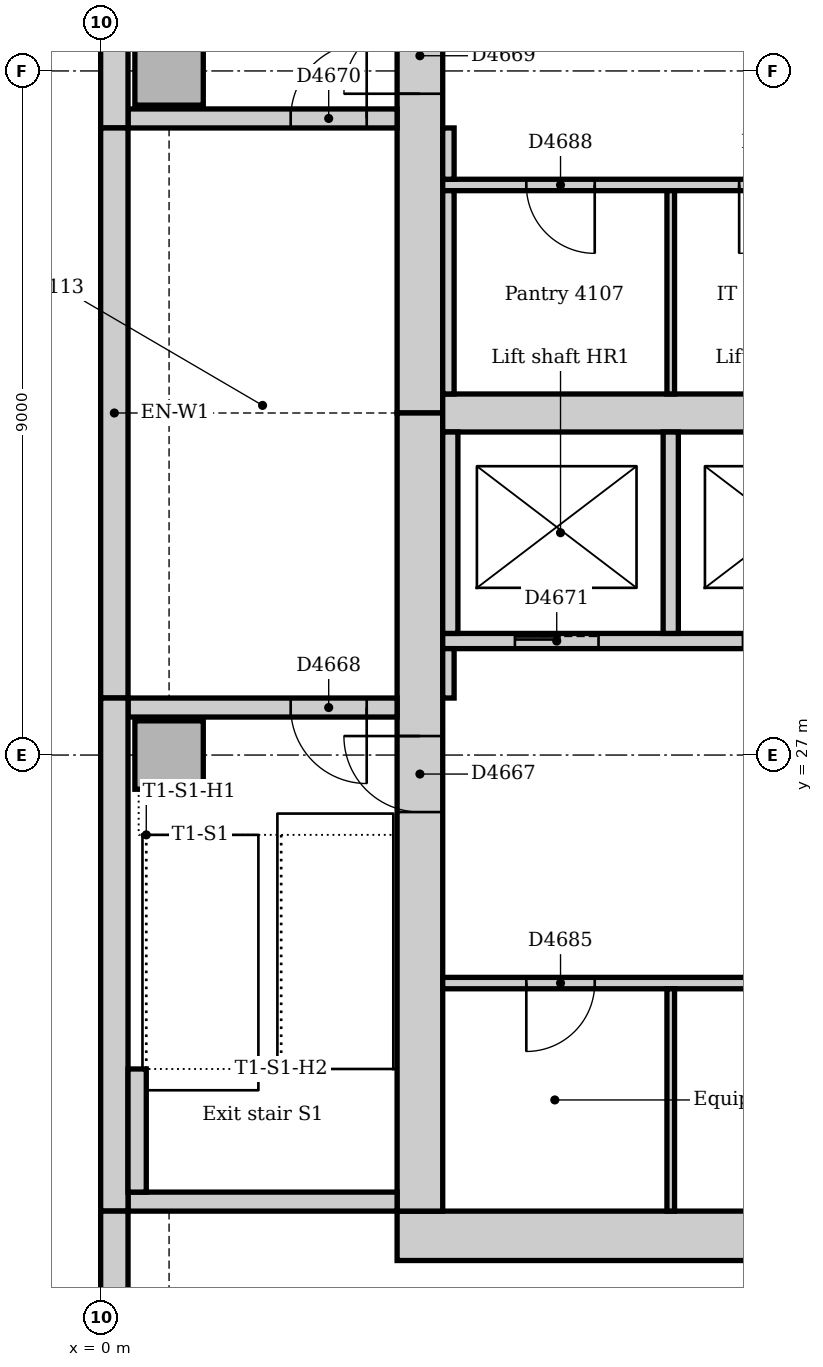
"""IFC4 building model, lengths in metres.
Left out: names, types, materials, properties, quantities, classifications, styles, units other than length and angle.
Written with IfcOpenShell. Run it as: python <this file> out.ifc"""

import sys

from ifc_helpers import new_model, si_unit, direction, frame, frame_2d, origin, origin_2d, place, context, subcontext, project, spatial, rectangle, extrude, element, fill, save


model = new_model("IFC4")
c1 = context("Model", 3, precision=1e-05, world=origin(), true_north=direction((0.0, 1.0)))
c2 = subcontext(c1, "Body", "Model", "MODEL_VIEW")
j1 = project(units=[si_unit("LENGTHUNIT", "METRE"), si_unit("PLANEANGLEUNIT", "RADIAN")], contexts=[c1])
p1 = place(None, origin())
s1 = spatial("IfcSite", under=j1, at=p1, CompositionType="ELEMENT")
p2 = place(p1, origin())
s2 = spatial("IfcBuilding", under=s1, at=p2, CompositionType="ELEMENT")
p3 = place(p2, frame((0.0, 0.0, 173.0)))
s3 = spatial("IfcBuildingStorey", under=s2, at=p3, CompositionType="ELEMENT", Elevation=173.0)
p4 = place(p3, frame((3.9, 20.675, 0.0), z_axis=(0.0, 0.0, 1.0), x_axis=(1.0, 0.0, 0.0)))
e1 = element("IfcWall", 1, at=p4, inside=s3, PredefinedType="SOLIDWALL", context=c2, shape_type="SweptSolid", body=[
    extrude(rectangle(XDim=19.25, YDim=0.65, at=frame_2d((9.625, 0.0))), origin(), (0.0, 0.0, 1.0), 4.0),
])
p5 = place(p3, frame((4.2, 42.0, 0.0), z_axis=(0.0, 0.0, 1.0), x_axis=(0.0, -1.0, 0.0)))
e2 = element("IfcWall", 2, at=p5, inside=s3, PredefinedType="SOLIDWALL", context=c2, shape_type="SweptSolid", body=[
    extrude(rectangle(XDim=10.5, YDim=0.6, at=frame_2d((5.25, 0.0))), origin(), (0.0, 0.0, 1.0), 4.0),
])
p6 = place(p5, frame((5.3, 0.0, 0.0)))
e3 = element("IfcOpeningElement", 3, at=p6, cuts=e2, PredefinedType="OPENING", context=c2, shape_type="SweptSolid", body=[
    extrude(rectangle(XDim=1.0, YDim=2.1, at=frame_2d((0.5, 1.05))), frame((0.0, 0.31, 0.0), z_axis=(0.0, -1.0, 0.0), x_axis=(1.0, 0.0, 0.0)), (0.0, 0.0, 1.0), 0.62),
])
p7 = place(p3, frame((4.2, 31.5, 0.0), z_axis=(0.0, 0.0, 1.0), x_axis=(0.0, -1.0, 0.0)))
e4 = element("IfcWall", 4, at=p7, inside=s3, PredefinedType="SOLIDWALL", context=c2, shape_type="SweptSolid", body=[
    extrude(rectangle(XDim=10.5, YDim=0.6, at=frame_2d((5.25, 0.0))), origin(), (0.0, 0.0, 1.0), 4.0),
])
p8 = place(p7, frame((4.25, 0.0, 0.0)))
e5 = element("IfcOpeningElement", 5, at=p8, cuts=e4, PredefinedType="OPENING", context=c2, shape_type="SweptSolid", body=[
    extrude(rectangle(XDim=1.0, YDim=2.1, at=frame_2d((0.5, 1.05))), frame((0.0, 0.31, 0.0), z_axis=(0.0, -1.0, 0.0), x_axis=(1.0, 0.0, 0.0)), (0.0, 0.0, 1.0), 0.62),
])
p9 = place(p3, frame((4.5, 31.5, 0.0), z_axis=(0.0, 0.0, 1.0), x_axis=(1.0, 0.0, 0.0)))
e6 = element("IfcWall", 6, at=p9, inside=s3, PredefinedType="SOLIDWALL", context=c2, shape_type="SweptSolid", body=[
    extrude(rectangle(XDim=18.0, YDim=0.5, at=frame_2d((9.0, 0.0))), origin(), (0.0, 0.0, 1.0), 4.0),
])
p10 = place(p3, frame((0.36, 21.125, 0.0), z_axis=(0.0, 0.0, 1.0), x_axis=(1.0, 0.0, 0.0)))
e7 = element("IfcWall", 7, at=p10, inside=s3, PredefinedType="SOLIDWALL", context=c2, shape_type="SweptSolid", body=[
    extrude(rectangle(XDim=3.54, YDim=0.25, at=frame_2d((1.77, 0.0))), origin(), (0.0, 0.0, 1.0), 4.0),
])
p11 = place(p3, frame((3.9, 27.625, 0.0), z_axis=(0.0, 0.0, 1.0), x_axis=(-1.0, 0.0, 0.0)))
e8 = element("IfcWall", 8, at=p11, inside=s3, PredefinedType="SOLIDWALL", context=c2, shape_type="SweptSolid", body=[
    extrude(rectangle(XDim=3.54, YDim=0.25, at=frame_2d((1.77, 0.0))), origin(), (0.0, 0.0, 1.0), 4.0),
])
p12 = place(p11, frame((0.4, 0.0, 0.0)))
e9 = element("IfcOpeningElement", 9, at=p12, cuts=e8, PredefinedType="OPENING", context=c2, shape_type="SweptSolid", body=[
    extrude(rectangle(XDim=1.0, YDim=2.1, at=frame_2d((0.5, 1.05))), frame((0.0, 0.135, 0.0), z_axis=(0.0, -1.0, 0.0), x_axis=(1.0, 0.0, 0.0)), (0.0, 0.0, 1.0), 0.27),
])
p13 = place(p3, frame((0.36, 35.375, 0.0), z_axis=(0.0, 0.0, 1.0), x_axis=(1.0, 0.0, 0.0)))
e10 = element("IfcWall", 10, at=p13, inside=s3, PredefinedType="SOLIDWALL", context=c2, shape_type="SweptSolid", body=[
    extrude(rectangle(XDim=3.54, YDim=0.25, at=frame_2d((1.77, 0.0))), origin(), (0.0, 0.0, 1.0), 4.0),
])
p14 = place(p13, frame((2.14, 0.0, 0.0)))
e11 = element("IfcOpeningElement", 11, at=p14, cuts=e10, PredefinedType="OPENING", context=c2, shape_type="SweptSolid", body=[
    extrude(rectangle(XDim=1.0, YDim=2.1, at=frame_2d((0.5, 1.05))), frame((0.0, 0.135, 0.0), z_axis=(0.0, -1.0, 0.0), x_axis=(1.0, 0.0, 0.0)), (0.0, 0.0, 1.0), 0.27),
])
for number, where, z_axis, x_axis in (
    (12, (0.9, 27.0, 0.0), (0.0, 0.0, 1.0), (1.0, 0.0, 0.0)),
    (13, (0.9, 36.0, 0.0), (0.0, 0.0, 1.0), (1.0, 0.0, 0.0)),
):
    element("IfcColumn", number, at=place(p3, frame(where, z_axis=z_axis, x_axis=x_axis)), inside=s3, PredefinedType="COLUMN", context=c2, shape_type="SweptSolid", body=[
        extrude(rectangle(XDim=0.9, YDim=0.9, at=origin_2d()), origin(), (0.0, 0.0, 1.0), 4.0),
    ])
p15 = place(p3, frame((0.18, 42.0, 0.0), z_axis=(0.0, 0.0, 1.0), x_axis=(0.0, -1.0, 0.0)))
e14 = element("IfcWall", 14, at=p15, inside=s3, PredefinedType="STANDARD", context=c2, shape_type="SweptSolid", body=[
    extrude(rectangle(XDim=6.75, YDim=0.36, at=frame_2d((3.375, 0.0))), origin(), (0.0, 0.0, 1.0), 3.85),
])
p16 = place(p3, frame((0.18, 35.25, 0.0), z_axis=(0.0, 0.0, 1.0), x_axis=(0.0, -1.0, 0.0)))
e15 = element("IfcWall", 15, at=p16, inside=s3, PredefinedType="STANDARD", context=c2, shape_type="SweptSolid", body=[
    extrude(rectangle(XDim=7.5, YDim=0.36, at=frame_2d((3.75, 0.0))), origin(), (0.0, 0.0, 1.0), 3.85),
])
p17 = place(p3, frame((0.18, 27.75, 0.0), z_axis=(0.0, 0.0, 1.0), x_axis=(0.0, -1.0, 0.0)))
e16 = element("IfcWall", 16, at=p17, inside=s3, PredefinedType="STANDARD", context=c2, shape_type="SweptSolid", body=[
    extrude(rectangle(XDim=6.75, YDim=0.36, at=frame_2d((3.375, 0.0))), origin(), (0.0, 0.0, 1.0), 3.85),
])
p18 = place(p3, frame((0.18, 21.0, 0.0), z_axis=(0.0, 0.0, 1.0), x_axis=(0.0, -1.0, 0.0)))
e17 = element("IfcWall", 17, at=p18, inside=s3, PredefinedType="STANDARD", context=c2, shape_type="SweptSolid", body=[
    extrude(rectangle(XDim=7.757, YDim=0.36, at=frame_2d((3.879, 0.0))), origin(), (0.0, 0.0, 1.0), 3.85),
])
p19 = place(p18, frame((1.35, 0.0, 0.9)))
e18 = element("IfcOpeningElement", 18, at=p19, cuts=e17, PredefinedType="OPENING", context=c2, shape_type="SweptSolid", body=[
    extrude(rectangle(XDim=3.3, YDim=1.6, at=frame_2d((1.65, 0.8))), frame((0.0, 0.19, 0.0), z_axis=(0.0, -1.0, 0.0), x_axis=(1.0, 0.0, 0.0)), (0.0, 0.0, 1.0), 0.38),
])
p20 = place(p3, frame((0.48, 21.25, 0.0), z_axis=(0.0, 0.0, 1.0), x_axis=(0.0, 1.0, 0.0)))
e19 = element("IfcWall", 19, at=p20, inside=s3, PredefinedType="STANDARD", context=c2, shape_type="SweptSolid", body=[
    extrude(rectangle(XDim=1.62, YDim=0.24, at=frame_2d((0.81, 0.0))), origin(), (0.0, 0.0, 1.0), 4.0),
])
p21 = place(p3, frame((4.5, 28.5, 0.0), z_axis=(0.0, 0.0, 1.0), x_axis=(1.0, 0.0, 0.0)))
e20 = element("IfcWall", 20, at=p21, inside=s3, PredefinedType="PARTITIONING", context=c2, shape_type="SweptSolid", body=[
    extrude(rectangle(XDim=18.0, YDim=0.2, at=frame_2d((9.0, 0.0))), origin(), (0.0, 0.0, 1.0), 3.85),
])
p22 = place(p21, frame((0.95, 0.0, 0.0)))
e21 = element("IfcOpeningElement", 21, at=p22, cuts=e20, PredefinedType="OPENING", context=c2, shape_type="SweptSolid", body=[
    extrude(rectangle(XDim=1.1, YDim=2.1, at=frame_2d((0.55, 1.05))), frame((0.0, 0.11, 0.0), z_axis=(0.0, -1.0, 0.0), x_axis=(1.0, 0.0, 0.0)), (0.0, 0.0, 1.0), 0.22),
])
p23 = place(p21, frame((3.95, 0.0, 0.0)))
e22 = element("IfcOpeningElement", 22, at=p23, cuts=e20, PredefinedType="OPENING", context=c2, shape_type="SweptSolid", body=[
    extrude(rectangle(XDim=1.1, YDim=2.1, at=frame_2d((0.55, 1.05))), frame((0.0, 0.11, 0.0), z_axis=(0.0, -1.0, 0.0), x_axis=(1.0, 0.0, 0.0)), (0.0, 0.0, 1.0), 0.22),
])
p24 = place(p21, frame((6.95, 0.0, 0.0)))
e23 = element("IfcOpeningElement", 23, at=p24, cuts=e20, PredefinedType="OPENING", context=c2, shape_type="SweptSolid", body=[
    extrude(rectangle(XDim=1.1, YDim=2.1, at=frame_2d((0.55, 1.05))), frame((0.0, 0.11, 0.0), z_axis=(0.0, -1.0, 0.0), x_axis=(1.0, 0.0, 0.0)), (0.0, 0.0, 1.0), 0.22),
])
p25 = place(p21, frame((9.95, 0.0, 0.0)))
e24 = element("IfcOpeningElement", 24, at=p25, cuts=e20, PredefinedType="OPENING", context=c2, shape_type="SweptSolid", body=[
    extrude(rectangle(XDim=1.1, YDim=2.1, at=frame_2d((0.55, 1.05))), frame((0.0, 0.11, 0.0), z_axis=(0.0, -1.0, 0.0), x_axis=(1.0, 0.0, 0.0)), (0.0, 0.0, 1.0), 0.22),
])
p26 = place(p21, frame((12.95, 0.0, 0.0)))
e25 = element("IfcOpeningElement", 25, at=p26, cuts=e20, PredefinedType="OPENING", context=c2, shape_type="SweptSolid", body=[
    extrude(rectangle(XDim=1.1, YDim=2.1, at=frame_2d((0.55, 1.05))), frame((0.0, 0.11, 0.0), z_axis=(0.0, -1.0, 0.0), x_axis=(1.0, 0.0, 0.0)), (0.0, 0.0, 1.0), 0.22),
])
p27 = place(p21, frame((15.95, 0.0, 0.0)))
e26 = element("IfcOpeningElement", 26, at=p27, cuts=e20, PredefinedType="OPENING", context=c2, shape_type="SweptSolid", body=[
    extrude(rectangle(XDim=1.1, YDim=2.1, at=frame_2d((0.55, 1.05))), frame((0.0, 0.11, 0.0), z_axis=(0.0, -1.0, 0.0), x_axis=(1.0, 0.0, 0.0)), (0.0, 0.0, 1.0), 0.22),
])
for number, where, z_axis, x_axis in (
    (27, (4.6, 28.6, 0.0), (0.0, 0.0, 1.0), (0.0, 1.0, 0.0)),
    (28, (7.5, 28.6, 0.0), (0.0, 0.0, 1.0), (0.0, 1.0, 0.0)),
):
    element("IfcWall", number, at=place(p3, frame(where, z_axis=z_axis, x_axis=x_axis)), inside=s3, PredefinedType="PARTITIONING", context=c2, shape_type="SweptSolid", body=[
        extrude(rectangle(XDim=2.65, YDim=0.2, at=frame_2d((1.325, 0.0))), origin(), (0.0, 0.0, 1.0), 3.85),
    ])
p28 = place(p3, frame((4.5, 24.0, 0.0), z_axis=(0.0, 0.0, 1.0), x_axis=(1.0, 0.0, 0.0)))
e29 = element("IfcWall", 29, at=p28, inside=s3, PredefinedType="PARTITIONING", context=c2, shape_type="SweptSolid", body=[
    extrude(rectangle(XDim=18.0, YDim=0.15, at=frame_2d((9.0, 0.0))), origin(), (0.0, 0.0, 1.0), 3.85),
])
p29 = place(p28, frame((1.1, 0.0, 0.0)))
e30 = element("IfcOpeningElement", 30, at=p29, cuts=e29, PredefinedType="OPENING", context=c2, shape_type="SweptSolid", body=[
    extrude(rectangle(XDim=0.9, YDim=2.1, at=frame_2d((0.45, 1.05))), frame((0.0, 0.085, 0.0), z_axis=(0.0, -1.0, 0.0), x_axis=(1.0, 0.0, 0.0)), (0.0, 0.0, 1.0), 0.17),
])
p30 = place(p28, frame((7.05, 0.0, 0.0)))
e31 = element("IfcOpeningElement", 31, at=p30, cuts=e29, PredefinedType="OPENING", context=c2, shape_type="SweptSolid", body=[
    extrude(rectangle(XDim=0.9, YDim=2.1, at=frame_2d((0.45, 1.05))), frame((0.0, 0.085, 0.0), z_axis=(0.0, -1.0, 0.0), x_axis=(1.0, 0.0, 0.0)), (0.0, 0.0, 1.0), 0.17),
])
p31 = place(p28, frame((14.45, 0.0, 0.0)))
e32 = element("IfcOpeningElement", 32, at=p31, cuts=e29, PredefinedType="OPENING", context=c2, shape_type="SweptSolid", body=[
    extrude(rectangle(XDim=0.9, YDim=2.1, at=frame_2d((0.45, 1.05))), frame((0.0, 0.085, 0.0), z_axis=(0.0, -1.0, 0.0), x_axis=(1.0, 0.0, 0.0)), (0.0, 0.0, 1.0), 0.17),
])
p32 = place(p3, frame((4.5, 34.5, 0.0), z_axis=(0.0, 0.0, 1.0), x_axis=(1.0, 0.0, 0.0)))
e33 = element("IfcWall", 33, at=p32, inside=s3, PredefinedType="PARTITIONING", context=c2, shape_type="SweptSolid", body=[
    extrude(rectangle(XDim=5.9, YDim=0.15, at=frame_2d((2.95, 0.0))), origin(), (0.0, 0.0, 1.0), 3.85),
])
p33 = place(p32, frame((1.1, 0.0, 0.0)))
e34 = element("IfcOpeningElement", 34, at=p33, cuts=e33, PredefinedType="OPENING", context=c2, shape_type="SweptSolid", body=[
    extrude(rectangle(XDim=0.9, YDim=2.1, at=frame_2d((0.45, 1.05))), frame((0.0, 0.085, 0.0), z_axis=(0.0, -1.0, 0.0), x_axis=(1.0, 0.0, 0.0)), (0.0, 0.0, 1.0), 0.17),
])
p34 = place(p32, frame((3.9, 0.0, 0.0)))
e35 = element("IfcOpeningElement", 35, at=p34, cuts=e33, PredefinedType="OPENING", context=c2, shape_type="SweptSolid", body=[
    extrude(rectangle(XDim=0.9, YDim=2.1, at=frame_2d((0.45, 1.05))), frame((0.0, 0.085, 0.0), z_axis=(0.0, -1.0, 0.0), x_axis=(1.0, 0.0, 0.0)), (0.0, 0.0, 1.0), 0.17),
])
p35 = place(p3, frame((4.575, 34.575, 0.0), z_axis=(0.0, 0.0, 1.0), x_axis=(0.0, 1.0, 0.0)))
e36 = element("IfcWall", 36, at=p35, inside=s3, PredefinedType="PARTITIONING", context=c2, shape_type="SweptSolid", body=[
    extrude(rectangle(XDim=0.675, YDim=0.15, at=frame_2d((0.338, 0.0))), origin(), (0.0, 0.0, 1.0), 3.85),
])
p36 = place(p3, frame((4.575, 31.75, 0.0), z_axis=(0.0, 0.0, 1.0), x_axis=(0.0, 1.0, 0.0)))
e37 = element("IfcWall", 37, at=p36, inside=s3, PredefinedType="PARTITIONING", context=c2, shape_type="SweptSolid", body=[
    extrude(rectangle(XDim=2.675, YDim=0.15, at=frame_2d((1.337, 0.0))), origin(), (0.0, 0.0, 1.0), 3.85),
])
p37 = place(p3, frame((4.575, 27.75, 0.0), z_axis=(0.0, 0.0, 1.0), x_axis=(0.0, 1.0, 0.0)))
e38 = element("IfcWall", 38, at=p37, inside=s3, PredefinedType="PARTITIONING", context=c2, shape_type="SweptSolid", body=[
    extrude(rectangle(XDim=0.65, YDim=0.15, at=frame_2d((0.325, 0.0))), origin(), (0.0, 0.0, 1.0), 3.85),
])
p38 = place(p3, frame((7.5, 21.0, 0.0), z_axis=(0.0, 0.0, 1.0), x_axis=(0.0, 1.0, 0.0)))
e39 = element("IfcWall", 39, at=p38, inside=s3, PredefinedType="PARTITIONING", context=c2, shape_type="SweptSolid", body=[
    extrude(rectangle(XDim=2.925, YDim=0.1, at=frame_2d((1.462, 0.0))), origin(), (0.0, 0.0, 1.0), 3.85),
])
p39 = place(p3, frame((7.5, 31.75, 0.0), z_axis=(0.0, 0.0, 1.0), x_axis=(0.0, 1.0, 0.0)))
e40 = element("IfcWall", 40, at=p39, inside=s3, PredefinedType="PARTITIONING", context=c2, shape_type="SweptSolid", body=[
    extrude(rectangle(XDim=2.675, YDim=0.1, at=frame_2d((1.337, 0.0))), origin(), (0.0, 0.0, 1.0), 3.85),
])
p40 = place(p8, frame((1.0, 0.0, 0.0), z_axis=(0.0, 0.0, 1.0), x_axis=(-1.0, 0.0, 0.0)))
e41 = element("IfcDoor", 41, at=p40, inside=s3, OperationType="SINGLE_SWING_RIGHT", PredefinedType="DOOR", context=c2, shape_type="SweptSolid", body=[
    extrude(rectangle(XDim=1.0, YDim=2.1, at=frame_2d((0.5, 1.05))), frame((0.0, 0.025, 0.0), z_axis=(0.0, -1.0, 0.0), x_axis=(1.0, 0.0, 0.0)), (0.0, 0.0, 1.0), 0.05),
])
fill(e5, e41)
p41 = place(p12, origin())
e42 = element("IfcDoor", 42, at=p41, inside=s3, OperationType="SINGLE_SWING_LEFT", PredefinedType="DOOR", context=c2, shape_type="SweptSolid", body=[
    extrude(rectangle(XDim=1.0, YDim=2.1, at=frame_2d((0.5, 1.05))), frame((0.0, 0.025, 0.0), z_axis=(0.0, -1.0, 0.0), x_axis=(1.0, 0.0, 0.0)), (0.0, 0.0, 1.0), 0.05),
])
fill(e9, e42)
p42 = place(p6, frame((1.0, 0.0, 0.0), z_axis=(0.0, 0.0, 1.0), x_axis=(-1.0, 0.0, 0.0)))
e43 = element("IfcDoor", 43, at=p42, inside=s3, OperationType="SINGLE_SWING_LEFT", PredefinedType="DOOR", context=c2, shape_type="SweptSolid", body=[
    extrude(rectangle(XDim=1.0, YDim=2.1, at=frame_2d((0.5, 1.05))), frame((0.0, 0.025, 0.0), z_axis=(0.0, -1.0, 0.0), x_axis=(1.0, 0.0, 0.0)), (0.0, 0.0, 1.0), 0.05),
])
fill(e3, e43)
p43 = place(p14, origin())
e44 = element("IfcDoor", 44, at=p43, inside=s3, OperationType="SINGLE_SWING_RIGHT", PredefinedType="DOOR", context=c2, shape_type="SweptSolid", body=[
    extrude(rectangle(XDim=1.0, YDim=2.1, at=frame_2d((0.5, 1.05))), frame((0.0, 0.025, 0.0), z_axis=(0.0, -1.0, 0.0), x_axis=(1.0, 0.0, 0.0)), (0.0, 0.0, 1.0), 0.05),
])
fill(e11, e44)
p44 = place(p22, origin())
e45 = element("IfcDoor", 45, at=p44, inside=s3, OperationType="SLIDING_TO_LEFT", PredefinedType="DOOR", context=c2, shape_type="SweptSolid", body=[
    extrude(rectangle(XDim=1.1, YDim=2.1, at=frame_2d((0.55, 1.05))), frame((0.0, 0.025, 0.0), z_axis=(0.0, -1.0, 0.0), x_axis=(1.0, 0.0, 0.0)), (0.0, 0.0, 1.0), 0.05),
])
fill(e21, e45)
p45 = place(p29, frame((0.9, 0.0, 0.0), z_axis=(0.0, 0.0, 1.0), x_axis=(-1.0, 0.0, 0.0)))
e46 = element("IfcDoor", 46, at=p45, inside=s3, OperationType="SINGLE_SWING_RIGHT", PredefinedType="DOOR", context=c2, shape_type="SweptSolid", body=[
    extrude(rectangle(XDim=0.9, YDim=2.1, at=frame_2d((0.45, 1.05))), frame((0.0, 0.025, 0.0), z_axis=(0.0, -1.0, 0.0), x_axis=(1.0, 0.0, 0.0)), (0.0, 0.0, 1.0), 0.05),
])
fill(e30, e46)
p46 = place(p33, frame((0.9, 0.0, 0.0), z_axis=(0.0, 0.0, 1.0), x_axis=(-1.0, 0.0, 0.0)))
e47 = element("IfcDoor", 47, at=p46, inside=s3, OperationType="SINGLE_SWING_LEFT", PredefinedType="DOOR", context=c2, shape_type="SweptSolid", body=[
    extrude(rectangle(XDim=0.9, YDim=2.1, at=frame_2d((0.45, 1.05))), frame((0.0, 0.025, 0.0), z_axis=(0.0, -1.0, 0.0), x_axis=(1.0, 0.0, 0.0)), (0.0, 0.0, 1.0), 0.05),
])
fill(e34, e47)
p47 = place(p34, frame((0.9, 0.0, 0.0), z_axis=(0.0, 0.0, 1.0), x_axis=(-1.0, 0.0, 0.0)))
e48 = element("IfcDoor", 48, at=p47, inside=s3, OperationType="SINGLE_SWING_RIGHT", PredefinedType="DOOR", context=c2, shape_type="SweptSolid", body=[
    extrude(rectangle(XDim=0.9, YDim=2.1, at=frame_2d((0.45, 1.05))), frame((0.0, 0.025, 0.0), z_axis=(0.0, -1.0, 0.0), x_axis=(1.0, 0.0, 0.0)), (0.0, 0.0, 1.0), 0.05),
])
fill(e35, e48)
save(model, sys.argv[1])
